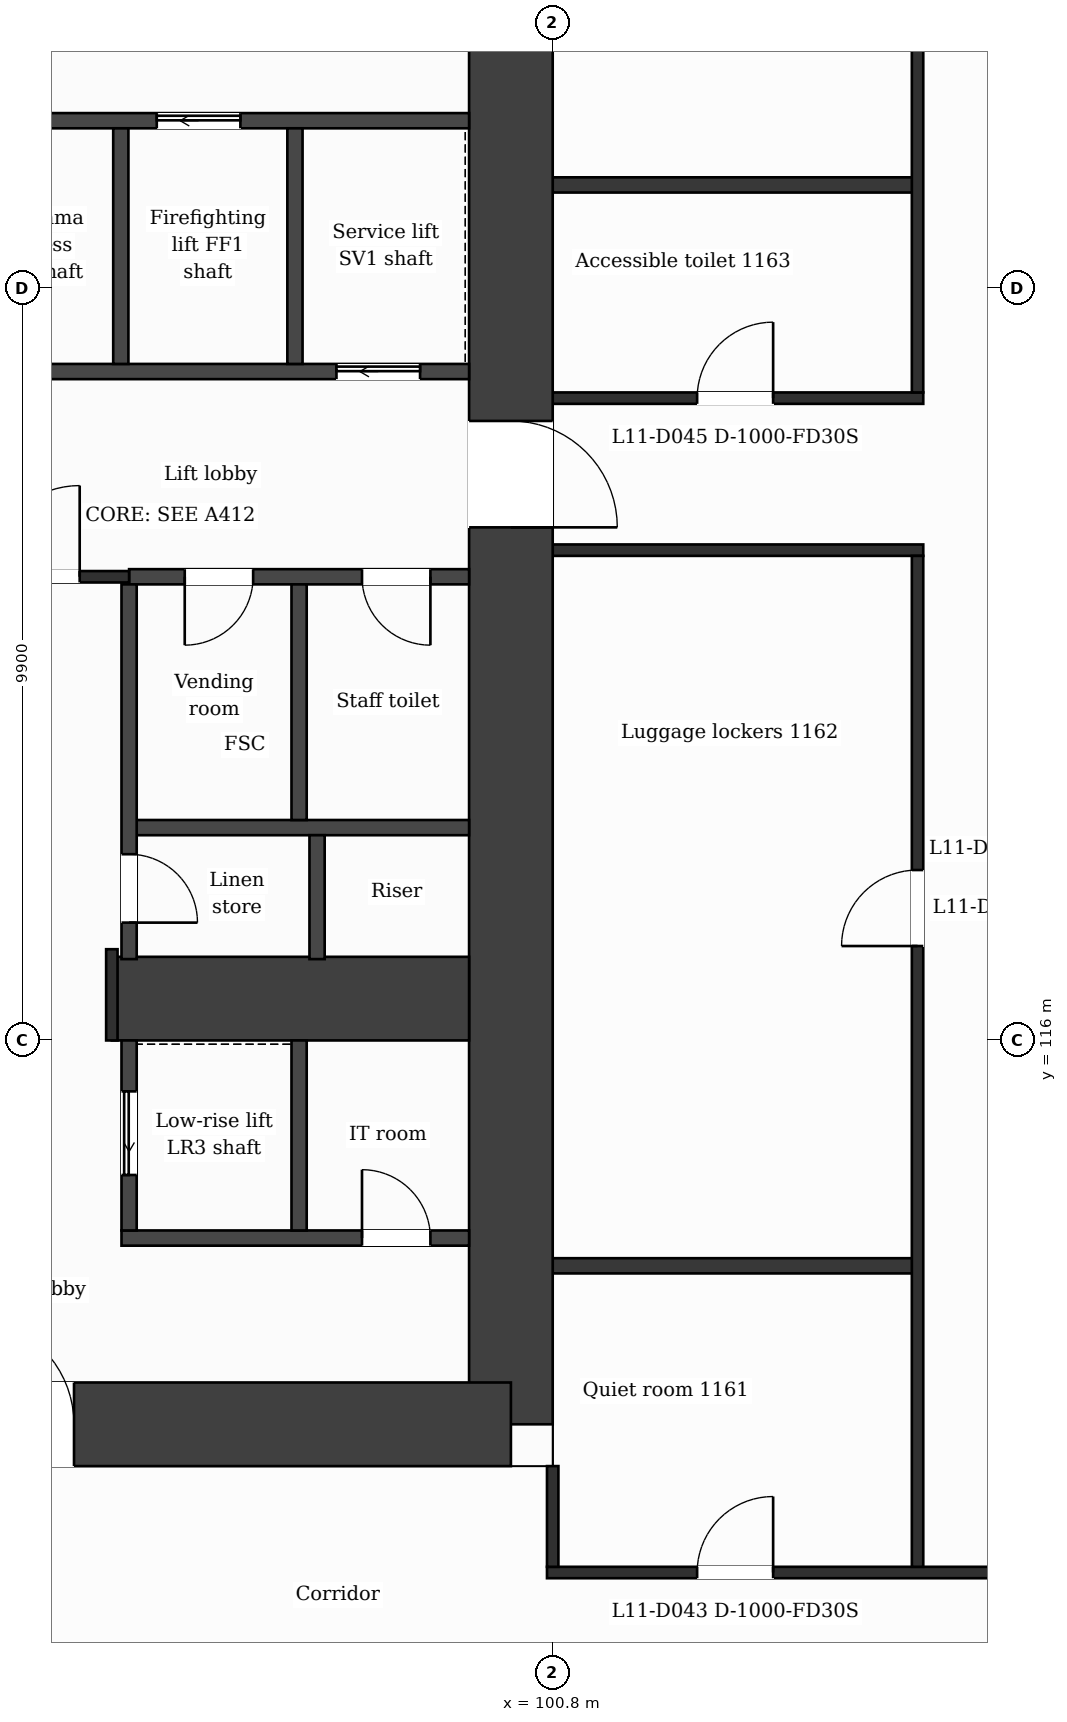
"""IFC4 building model, lengths in metres.
Left out: names, types, materials, properties, quantities, classifications, styles, units other than length and angle.
Written with IfcOpenShell. Run it as: python <this file> out.ifc"""

import sys

from ifc_helpers import new_model, si_unit, direction, frame, frame_2d, origin, place, context, subcontext, project, spatial, rectangle, extrude, element, fill, save


model = new_model("IFC4")
c1 = context("Model", 3, precision=1e-05, world=origin(), true_north=direction((0.0, 1.0)))
c2 = subcontext(c1, "Body", "Model", "MODEL_VIEW")
j1 = project(units=[si_unit("LENGTHUNIT", "METRE"), si_unit("PLANEANGLEUNIT", "RADIAN")], contexts=[c1])
p1 = place(None, origin())
s1 = spatial("IfcSite", under=j1, at=p1, CompositionType="ELEMENT")
p2 = place(p1, origin())
s2 = spatial("IfcBuilding", under=s1, at=p2, CompositionType="ELEMENT")
p3 = place(p2, frame((0.0, 0.0, 56.5)))
s3 = spatial("IfcBuildingStorey", under=s2, at=p3, CompositionType="ELEMENT", Elevation=56.5)
p4 = place(p3, frame((100.25, 131.85, 0.0), z_axis=(0.0, 0.0, 1.0), x_axis=(0.0, -1.0, 0.0)))
e1 = element("IfcWall", 1, at=p4, inside=s3, PredefinedType="SHEAR", context=c2, shape_type="SweptSolid", body=[
    extrude(rectangle(XDim=20.9, YDim=1.1, at=frame_2d((10.45, 0.0))), origin(), (0.0, 0.0, 1.0), 3.5),
])
p5 = place(p4, frame((7.7, 0.0, 0.0)))
e2 = element("IfcOpeningElement", 2, at=p5, cuts=e1, PredefinedType="OPENING", context=c2, shape_type="SweptSolid", body=[
    extrude(rectangle(XDim=1.4, YDim=2.1, at=frame_2d((0.7, 1.05))), frame((0.0, 0.56, 0.0), z_axis=(0.0, -1.0, 0.0), x_axis=(1.0, 0.0, 0.0)), (0.0, 0.0, 1.0), 1.12),
])
p6 = place(p3, frame((100.25, 110.95, 0.0), z_axis=(0.0, 0.0, 1.0), x_axis=(-1.0, 0.0, 0.0)))
e3 = element("IfcWall", 3, at=p6, inside=s3, PredefinedType="SHEAR", context=c2, shape_type="SweptSolid", body=[
    extrude(rectangle(XDim=13.952, YDim=1.1, at=frame_2d((6.976, 0.0))), origin(), (0.0, 0.0, 1.0), 3.5),
])
p7 = place(p6, frame((5.748, 0.0, 0.0)))
e4 = element("IfcOpeningElement", 4, at=p7, cuts=e3, PredefinedType="OPENING", context=c2, shape_type="SweptSolid", body=[
    extrude(rectangle(XDim=1.4, YDim=2.1, at=frame_2d((0.7, 1.05))), frame((0.0, 0.56, 0.0), z_axis=(0.0, -1.0, 0.0), x_axis=(1.0, 0.0, 0.0)), (0.0, 0.0, 1.0), 1.12),
])
p8 = place(p3, frame((95.0, 116.55, 0.0), z_axis=(0.0, 0.0, 1.0), x_axis=(1.0, 0.0, 0.0)))
e5 = element("IfcWall", 5, at=p8, inside=s3, PredefinedType="SHEAR", context=c2, shape_type="SweptSolid", body=[
    extrude(rectangle(XDim=4.7, YDim=1.1, at=frame_2d((2.35, 0.0))), origin(), (0.0, 0.0, 1.0), 3.5),
])
p9 = place(p3, frame((100.725, 109.0, 0.0), z_axis=(0.0, 0.0, 1.0), x_axis=(1.0, 0.0, 0.0)))
e6 = element("IfcWall", 6, at=p9, inside=s3, PredefinedType="PARTITIONING", context=c2, shape_type="SweptSolid", body=[
    extrude(rectangle(XDim=25.35, YDim=0.15, at=frame_2d((12.675, 0.0))), origin(), (0.0, 0.0, 1.0), 3.18),
])
p10 = place(p9, frame((1.975, 0.0, 0.0)))
e7 = element("IfcOpeningElement", 7, at=p10, cuts=e6, PredefinedType="OPENING", context=c2, shape_type="SweptSolid", body=[
    extrude(rectangle(XDim=1.0, YDim=2.1, at=frame_2d((0.5, 1.05))), frame((0.0, 0.085, 0.0), z_axis=(0.0, -1.0, 0.0), x_axis=(1.0, 0.0, 0.0)), (0.0, 0.0, 1.0), 0.17),
])
p11 = place(p9, frame((10.325, 0.0, 0.0)))
e8 = element("IfcOpeningElement", 8, at=p11, cuts=e6, PredefinedType="OPENING", context=c2, shape_type="SweptSolid", body=[
    extrude(rectangle(XDim=1.0, YDim=2.1, at=frame_2d((0.5, 1.05))), frame((0.0, 0.085, 0.0), z_axis=(0.0, -1.0, 0.0), x_axis=(1.0, 0.0, 0.0)), (0.0, 0.0, 1.0), 0.17),
])
p12 = place(p9, frame((14.9, 0.0, 0.0)))
e9 = element("IfcOpeningElement", 9, at=p12, cuts=e6, PredefinedType="OPENING", context=c2, shape_type="SweptSolid", body=[
    extrude(rectangle(XDim=1.0, YDim=2.1, at=frame_2d((0.5, 1.05))), frame((0.0, 0.085, 0.0), z_axis=(0.0, -1.0, 0.0), x_axis=(1.0, 0.0, 0.0)), (0.0, 0.0, 1.0), 0.17),
])
p13 = place(p9, frame((22.685, 0.0, 0.0)))
e10 = element("IfcOpeningElement", 10, at=p13, cuts=e6, PredefinedType="OPENING", context=c2, shape_type="SweptSolid", body=[
    extrude(rectangle(XDim=1.0, YDim=2.1, at=frame_2d((0.5, 1.05))), frame((0.0, 0.085, 0.0), z_axis=(0.0, -1.0, 0.0), x_axis=(1.0, 0.0, 0.0)), (0.0, 0.0, 1.0), 0.17),
])
p14 = place(p3, frame((100.8, 113.035, 0.0), z_axis=(0.0, 0.0, 1.0), x_axis=(1.0, 0.0, 0.0)))
e11 = element("IfcWall", 11, at=p14, inside=s3, PredefinedType="PARTITIONING", context=c2, shape_type="SweptSolid", body=[
    extrude(rectangle(XDim=4.8, YDim=0.2, at=frame_2d((2.4, 0.0))), origin(), (0.0, 0.0, 1.0), 3.18),
])
p15 = place(p3, frame((95.127, 113.4, 0.0), z_axis=(0.0, 0.0, 1.0), x_axis=(1.0, 0.0, 0.0)))
e12 = element("IfcWall", 12, at=p15, inside=s3, PredefinedType="PARTITIONING", context=c2, shape_type="SweptSolid", body=[
    extrude(rectangle(XDim=4.573, YDim=0.2, at=frame_2d((2.287, 0.0))), origin(), (0.0, 0.0, 1.0), 3.18),
])
p16 = place(p15, frame((3.164, 0.0, 0.0)))
e13 = element("IfcOpeningElement", 13, at=p16, cuts=e12, PredefinedType="OPENING", context=c2, shape_type="SweptSolid", body=[
    extrude(rectangle(XDim=0.9, YDim=2.1, at=frame_2d((0.45, 1.05))), frame((0.0, 0.11, 0.0), z_axis=(0.0, -1.0, 0.0), x_axis=(1.0, 0.0, 0.0)), (0.0, 0.0, 1.0), 0.22),
])
p17 = place(p3, frame((95.227, 118.8, 0.0), z_axis=(0.0, 0.0, 1.0), x_axis=(1.0, 0.0, 0.0)))
e14 = element("IfcWall", 14, at=p17, inside=s3, PredefinedType="PARTITIONING", context=c2, shape_type="SweptSolid", body=[
    extrude(rectangle(XDim=4.473, YDim=0.2, at=frame_2d((2.236, 0.0))), origin(), (0.0, 0.0, 1.0), 3.18),
])
p18 = place(p3, frame((95.227, 122.1, 0.0), z_axis=(0.0, 0.0, 1.0), x_axis=(1.0, 0.0, 0.0)))
e15 = element("IfcWall", 15, at=p18, inside=s3, PredefinedType="PARTITIONING", context=c2, shape_type="SweptSolid", body=[
    extrude(rectangle(XDim=4.473, YDim=0.2, at=frame_2d((2.236, 0.0))), origin(), (0.0, 0.0, 1.0), 3.18),
])
p19 = place(p18, frame((0.732, 0.0, 0.0)))
e16 = element("IfcOpeningElement", 16, at=p19, cuts=e15, PredefinedType="OPENING", context=c2, shape_type="SweptSolid", body=[
    extrude(rectangle(XDim=0.9, YDim=2.1, at=frame_2d((0.45, 1.05))), frame((0.0, 0.11, 0.0), z_axis=(0.0, -1.0, 0.0), x_axis=(1.0, 0.0, 0.0)), (0.0, 0.0, 1.0), 0.22),
])
p20 = place(p18, frame((3.064, 0.0, 0.0)))
e17 = element("IfcOpeningElement", 17, at=p20, cuts=e15, PredefinedType="OPENING", context=c2, shape_type="SweptSolid", body=[
    extrude(rectangle(XDim=0.9, YDim=2.1, at=frame_2d((0.45, 1.05))), frame((0.0, 0.11, 0.0), z_axis=(0.0, -1.0, 0.0), x_axis=(1.0, 0.0, 0.0)), (0.0, 0.0, 1.0), 0.22),
])
p21 = place(p3, frame((92.827, 122.1, 0.0), z_axis=(0.0, 0.0, 1.0), x_axis=(1.0, 0.0, 0.0)))
e18 = element("IfcWall", 18, at=p21, inside=s3, PredefinedType="PARTITIONING", context=c2, shape_type="SweptSolid", body=[
    extrude(rectangle(XDim=2.4, YDim=0.15, at=frame_2d((1.2, 0.0))), origin(), (0.0, 0.0, 1.0), 3.18),
])
p22 = place(p21, frame((0.55, 0.0, 0.0)))
e19 = element("IfcOpeningElement", 19, at=p22, cuts=e18, PredefinedType="OPENING", context=c2, shape_type="SweptSolid", body=[
    extrude(rectangle(XDim=1.2, YDim=2.1, at=frame_2d((0.6, 1.05))), frame((0.0, 0.085, 0.0), z_axis=(0.0, -1.0, 0.0), x_axis=(1.0, 0.0, 0.0)), (0.0, 0.0, 1.0), 0.17),
])
p23 = place(p3, frame((100.8, 122.45, 0.0), z_axis=(0.0, 0.0, 1.0), x_axis=(1.0, 0.0, 0.0)))
e20 = element("IfcWall", 20, at=p23, inside=s3, PredefinedType="PARTITIONING", context=c2, shape_type="SweptSolid", body=[
    extrude(rectangle(XDim=4.875, YDim=0.15, at=frame_2d((2.438, 0.0))), origin(), (0.0, 0.0, 1.0), 3.18),
])
p24 = place(p3, frame((100.8, 124.45, 0.0), z_axis=(0.0, 0.0, 1.0), x_axis=(1.0, 0.0, 0.0)))
e21 = element("IfcWall", 21, at=p24, inside=s3, PredefinedType="PARTITIONING", context=c2, shape_type="SweptSolid", body=[
    extrude(rectangle(XDim=4.875, YDim=0.15, at=frame_2d((2.438, 0.0))), origin(), (0.0, 0.0, 1.0), 3.18),
])
p25 = place(p24, frame((1.9, 0.0, 0.0)))
e22 = element("IfcOpeningElement", 22, at=p25, cuts=e21, PredefinedType="OPENING", context=c2, shape_type="SweptSolid", body=[
    extrude(rectangle(XDim=1.0, YDim=2.1, at=frame_2d((0.5, 1.05))), frame((0.0, 0.085, 0.0), z_axis=(0.0, -1.0, 0.0), x_axis=(1.0, 0.0, 0.0)), (0.0, 0.0, 1.0), 0.17),
])
p26 = place(p3, frame((92.702, 124.8, 0.0), z_axis=(0.0, 0.0, 1.0), x_axis=(1.0, 0.0, 0.0)))
e23 = element("IfcWall", 23, at=p26, inside=s3, PredefinedType="PARTITIONING", context=c2, shape_type="SweptSolid", body=[
    extrude(rectangle(XDim=6.998, YDim=0.2, at=frame_2d((3.499, 0.0))), origin(), (0.0, 0.0, 1.0), 3.18),
])
p27 = place(p26, frame((5.253, 0.0, 0.0)))
e24 = element("IfcOpeningElement", 24, at=p27, cuts=e23, PredefinedType="OPENING", context=c2, shape_type="SweptSolid", body=[
    extrude(rectangle(XDim=1.1, YDim=2.1, at=frame_2d((0.55, 1.05))), frame((0.0, 0.11, 0.0), z_axis=(0.0, -1.0, 0.0), x_axis=(1.0, 0.0, 0.0)), (0.0, 0.0, 1.0), 0.22),
])
p28 = place(p3, frame((100.8, 127.255, 0.0), z_axis=(0.0, 0.0, 1.0), x_axis=(1.0, 0.0, 0.0)))
e25 = element("IfcWall", 25, at=p28, inside=s3, PredefinedType="PARTITIONING", context=c2, shape_type="SweptSolid", body=[
    extrude(rectangle(XDim=4.8, YDim=0.2, at=frame_2d((2.4, 0.0))), origin(), (0.0, 0.0, 1.0), 3.18),
])
p29 = place(p3, frame((92.827, 128.1, 0.0), z_axis=(0.0, 0.0, 1.0), x_axis=(1.0, 0.0, 0.0)))
e26 = element("IfcWall", 26, at=p29, inside=s3, PredefinedType="PARTITIONING", context=c2, shape_type="SweptSolid", body=[
    extrude(rectangle(XDim=6.873, YDim=0.2, at=frame_2d((3.437, 0.0))), origin(), (0.0, 0.0, 1.0), 3.18),
])
p30 = place(p29, frame((2.764, 0.0, 0.0)))
e27 = element("IfcOpeningElement", 27, at=p30, cuts=e26, PredefinedType="OPENING", context=c2, shape_type="SweptSolid", body=[
    extrude(rectangle(XDim=1.1, YDim=2.1, at=frame_2d((0.55, 1.05))), frame((0.0, 0.11, 0.0), z_axis=(0.0, -1.0, 0.0), x_axis=(1.0, 0.0, 0.0)), (0.0, 0.0, 1.0), 0.22),
])
p31 = place(p3, frame((95.0, 116.0, 0.0), z_axis=(0.0, 0.0, 1.0), x_axis=(0.0, 1.0, 0.0)))
e28 = element("IfcWall", 28, at=p31, inside=s3, PredefinedType="PARTITIONING", context=c2, shape_type="SweptSolid", body=[
    extrude(rectangle(XDim=1.2, YDim=0.15, at=frame_2d((0.6, 0.0))), origin(), (0.0, 0.0, 1.0), 3.18),
])
p32 = place(p3, frame((95.118, 124.9, 0.0), z_axis=(0.0, 0.0, 1.0), x_axis=(0.0, 1.0, 0.0)))
e29 = element("IfcWall", 29, at=p32, inside=s3, PredefinedType="PARTITIONING", context=c2, shape_type="SweptSolid", body=[
    extrude(rectangle(XDim=3.1, YDim=0.2, at=frame_2d((1.55, 0.0))), origin(), (0.0, 0.0, 1.0), 3.18),
])
p33 = place(p3, frame((95.227, 113.5, 0.0), z_axis=(0.0, 0.0, 1.0), x_axis=(0.0, 1.0, 0.0)))
e30 = element("IfcWall", 30, at=p33, inside=s3, PredefinedType="PARTITIONING", context=c2, shape_type="SweptSolid", body=[
    extrude(rectangle(XDim=2.5, YDim=0.2, at=frame_2d((1.25, 0.0))), origin(), (0.0, 0.0, 1.0), 3.18),
])
p34 = place(p33, frame((0.73, 0.0, 0.0)))
e31 = element("IfcOpeningElement", 31, at=p34, cuts=e30, PredefinedType="OPENING", context=c2, shape_type="SweptSolid", body=[
    extrude(rectangle(XDim=1.1, YDim=2.1, at=frame_2d((0.55, 1.05))), frame((0.0, 0.11, 0.0), z_axis=(0.0, -1.0, 0.0), x_axis=(1.0, 0.0, 0.0)), (0.0, 0.0, 1.0), 0.22),
])
p35 = place(p3, frame((95.227, 117.07, 0.0), z_axis=(0.0, 0.0, 1.0), x_axis=(0.0, 1.0, 0.0)))
e32 = element("IfcWall", 32, at=p35, inside=s3, PredefinedType="PARTITIONING", context=c2, shape_type="SweptSolid", body=[
    extrude(rectangle(XDim=4.93, YDim=0.2, at=frame_2d((2.465, 0.0))), origin(), (0.0, 0.0, 1.0), 3.18),
])
p36 = place(p35, frame((0.48, 0.0, 0.0)))
e33 = element("IfcOpeningElement", 33, at=p36, cuts=e32, PredefinedType="OPENING", context=c2, shape_type="SweptSolid", body=[
    extrude(rectangle(XDim=0.9, YDim=2.1, at=frame_2d((0.45, 1.05))), frame((0.0, 0.11, 0.0), z_axis=(0.0, -1.0, 0.0), x_axis=(1.0, 0.0, 0.0)), (0.0, 0.0, 1.0), 0.22),
])
p37 = place(p3, frame((97.409, 124.9, 0.0), z_axis=(0.0, 0.0, 1.0), x_axis=(0.0, 1.0, 0.0)))
e34 = element("IfcWall", 34, at=p37, inside=s3, PredefinedType="PARTITIONING", context=c2, shape_type="SweptSolid", body=[
    extrude(rectangle(XDim=3.1, YDim=0.2, at=frame_2d((1.55, 0.0))), origin(), (0.0, 0.0, 1.0), 3.18),
])
p38 = place(p3, frame((97.463, 113.5, 0.0), z_axis=(0.0, 0.0, 1.0), x_axis=(0.0, 1.0, 0.0)))
e35 = element("IfcWall", 35, at=p38, inside=s3, PredefinedType="PARTITIONING", context=c2, shape_type="SweptSolid", body=[
    extrude(rectangle(XDim=2.5, YDim=0.2, at=frame_2d((1.25, 0.0))), origin(), (0.0, 0.0, 1.0), 3.18),
])
p39 = place(p3, frame((97.463, 118.9, 0.0), z_axis=(0.0, 0.0, 1.0), x_axis=(0.0, 1.0, 0.0)))
e36 = element("IfcWall", 36, at=p39, inside=s3, PredefinedType="PARTITIONING", context=c2, shape_type="SweptSolid", body=[
    extrude(rectangle(XDim=3.1, YDim=0.2, at=frame_2d((1.55, 0.0))), origin(), (0.0, 0.0, 1.0), 3.18),
])
p40 = place(p3, frame((97.7, 117.07, 0.0), z_axis=(0.0, 0.0, 1.0), x_axis=(0.0, 1.0, 0.0)))
e37 = element("IfcWall", 37, at=p40, inside=s3, PredefinedType="PARTITIONING", context=c2, shape_type="SweptSolid", body=[
    extrude(rectangle(XDim=1.63, YDim=0.2, at=frame_2d((0.815, 0.0))), origin(), (0.0, 0.0, 1.0), 3.18),
])
p41 = place(p3, frame((100.8, 109.075, 0.0), z_axis=(0.0, 0.0, 1.0), x_axis=(0.0, 1.0, 0.0)))
e38 = element("IfcWall", 38, at=p41, inside=s3, PredefinedType="PARTITIONING", context=c2, shape_type="SweptSolid", body=[
    extrude(rectangle(XDim=1.325, YDim=0.15, at=frame_2d((0.663, 0.0))), origin(), (0.0, 0.0, 1.0), 3.18),
])
p42 = place(p3, frame((105.6, 109.075, 0.0), z_axis=(0.0, 0.0, 1.0), x_axis=(0.0, 1.0, 0.0)))
e39 = element("IfcWall", 39, at=p42, inside=s3, PredefinedType="PARTITIONING", context=c2, shape_type="SweptSolid", body=[
    extrude(rectangle(XDim=13.3, YDim=0.15, at=frame_2d((6.65, 0.0))), origin(), (0.0, 0.0, 1.0), 3.18),
])
p43 = place(p42, frame((8.167, 0.0, 0.0)))
e40 = element("IfcOpeningElement", 40, at=p43, cuts=e39, PredefinedType="OPENING", context=c2, shape_type="SweptSolid", body=[
    extrude(rectangle(XDim=1.0, YDim=2.1, at=frame_2d((0.5, 1.05))), frame((0.0, 0.085, 0.0), z_axis=(0.0, -1.0, 0.0), x_axis=(1.0, 0.0, 0.0)), (0.0, 0.0, 1.0), 0.17),
])
p44 = place(p3, frame((105.6, 124.525, 0.0), z_axis=(0.0, 0.0, 1.0), x_axis=(0.0, 1.0, 0.0)))
e41 = element("IfcWall", 41, at=p44, inside=s3, PredefinedType="PARTITIONING", context=c2, shape_type="SweptSolid", body=[
    extrude(rectangle(XDim=9.2, YDim=0.15, at=frame_2d((4.6, 0.0))), origin(), (0.0, 0.0, 1.0), 3.18),
])
p45 = place(p44, frame((5.018, 0.0, 0.0)))
e42 = element("IfcOpeningElement", 42, at=p45, cuts=e41, PredefinedType="OPENING", context=c2, shape_type="SweptSolid", body=[
    extrude(rectangle(XDim=1.0, YDim=2.1, at=frame_2d((0.5, 1.05))), frame((0.0, 0.085, 0.0), z_axis=(0.0, -1.0, 0.0), x_axis=(1.0, 0.0, 0.0)), (0.0, 0.0, 1.0), 0.17),
])
p46 = place(p22, origin())
e43 = element("IfcDoor", 43, at=p46, inside=s3, OperationType="SINGLE_SWING_RIGHT", PredefinedType="DOOR", context=c2, shape_type="SweptSolid", body=[
    extrude(rectangle(XDim=1.2, YDim=2.1, at=frame_2d((0.6, 1.05))), frame((0.0, 0.025, 0.0), z_axis=(0.0, -1.0, 0.0), x_axis=(1.0, 0.0, 0.0)), (0.0, 0.0, 1.0), 0.05),
])
fill(e19, e43)
p47 = place(p30, origin())
e44 = element("IfcDoor", 44, at=p47, inside=s3, OperationType="SLIDING_TO_LEFT", PredefinedType="DOOR", context=c2, shape_type="SweptSolid", body=[
    extrude(rectangle(XDim=1.1, YDim=2.1, at=frame_2d((0.55, 1.05))), frame((0.0, 0.025, 0.0), z_axis=(0.0, -1.0, 0.0), x_axis=(1.0, 0.0, 0.0)), (0.0, 0.0, 1.0), 0.05),
])
fill(e27, e44)
p48 = place(p27, origin())
e45 = element("IfcDoor", 45, at=p48, inside=s3, OperationType="SLIDING_TO_LEFT", PredefinedType="DOOR", context=c2, shape_type="SweptSolid", body=[
    extrude(rectangle(XDim=1.1, YDim=2.1, at=frame_2d((0.55, 1.05))), frame((0.0, 0.025, 0.0), z_axis=(0.0, -1.0, 0.0), x_axis=(1.0, 0.0, 0.0)), (0.0, 0.0, 1.0), 0.05),
])
fill(e24, e45)
p49 = place(p19, origin())
e46 = element("IfcDoor", 46, at=p49, inside=s3, OperationType="SINGLE_SWING_LEFT", PredefinedType="DOOR", context=c2, shape_type="SweptSolid", body=[
    extrude(rectangle(XDim=0.9, YDim=2.1, at=frame_2d((0.45, 1.05))), frame((0.0, 0.025, 0.0), z_axis=(0.0, -1.0, 0.0), x_axis=(1.0, 0.0, 0.0)), (0.0, 0.0, 1.0), 0.05),
])
fill(e16, e46)
p50 = place(p20, origin())
e47 = element("IfcDoor", 47, at=p50, inside=s3, OperationType="SINGLE_SWING_RIGHT", PredefinedType="DOOR", context=c2, shape_type="SweptSolid", body=[
    extrude(rectangle(XDim=0.9, YDim=2.1, at=frame_2d((0.45, 1.05))), frame((0.0, 0.025, 0.0), z_axis=(0.0, -1.0, 0.0), x_axis=(1.0, 0.0, 0.0)), (0.0, 0.0, 1.0), 0.05),
])
fill(e17, e47)
p51 = place(p36, origin())
e48 = element("IfcDoor", 48, at=p51, inside=s3, OperationType="SINGLE_SWING_LEFT", PredefinedType="DOOR", context=c2, shape_type="SweptSolid", body=[
    extrude(rectangle(XDim=0.9, YDim=2.1, at=frame_2d((0.45, 1.05))), frame((0.0, 0.025, 0.0), z_axis=(0.0, -1.0, 0.0), x_axis=(1.0, 0.0, 0.0)), (0.0, 0.0, 1.0), 0.05),
])
fill(e33, e48)
p52 = place(p34, origin())
e49 = element("IfcDoor", 49, at=p52, inside=s3, OperationType="SLIDING_TO_LEFT", PredefinedType="DOOR", context=c2, shape_type="SweptSolid", body=[
    extrude(rectangle(XDim=1.1, YDim=2.1, at=frame_2d((0.55, 1.05))), frame((0.0, 0.025, 0.0), z_axis=(0.0, -1.0, 0.0), x_axis=(1.0, 0.0, 0.0)), (0.0, 0.0, 1.0), 0.05),
])
fill(e31, e49)
p53 = place(p16, origin())
e50 = element("IfcDoor", 50, at=p53, inside=s3, OperationType="SINGLE_SWING_LEFT", PredefinedType="DOOR", context=c2, shape_type="SweptSolid", body=[
    extrude(rectangle(XDim=0.9, YDim=2.1, at=frame_2d((0.45, 1.05))), frame((0.0, 0.025, 0.0), z_axis=(0.0, -1.0, 0.0), x_axis=(1.0, 0.0, 0.0)), (0.0, 0.0, 1.0), 0.05),
])
fill(e13, e50)
p54 = place(p10, origin())
e51 = element("IfcDoor", 51, at=p54, inside=s3, OperationType="SINGLE_SWING_RIGHT", PredefinedType="DOOR", context=c2, shape_type="SweptSolid", body=[
    extrude(rectangle(XDim=1.0, YDim=2.1, at=frame_2d((0.5, 1.05))), frame((0.0, 0.025, 0.0), z_axis=(0.0, -1.0, 0.0), x_axis=(1.0, 0.0, 0.0)), (0.0, 0.0, 1.0), 0.05),
])
fill(e7, e51)
p55 = place(p43, origin())
e52 = element("IfcDoor", 52, at=p55, inside=s3, OperationType="SINGLE_SWING_LEFT", PredefinedType="DOOR", context=c2, shape_type="SweptSolid", body=[
    extrude(rectangle(XDim=1.0, YDim=2.1, at=frame_2d((0.5, 1.05))), frame((0.0, 0.025, 0.0), z_axis=(0.0, -1.0, 0.0), x_axis=(1.0, 0.0, 0.0)), (0.0, 0.0, 1.0), 0.05),
])
fill(e40, e52)
p56 = place(p25, origin())
e53 = element("IfcDoor", 53, at=p56, inside=s3, OperationType="SINGLE_SWING_RIGHT", PredefinedType="DOOR", context=c2, shape_type="SweptSolid", body=[
    extrude(rectangle(XDim=1.0, YDim=2.1, at=frame_2d((0.5, 1.05))), frame((0.0, 0.025, 0.0), z_axis=(0.0, -1.0, 0.0), x_axis=(1.0, 0.0, 0.0)), (0.0, 0.0, 1.0), 0.05),
])
fill(e22, e53)
p57 = place(p7, origin())
e54 = element("IfcDoor", 54, at=p57, inside=s3, OperationType="SINGLE_SWING_RIGHT", PredefinedType="DOOR", context=c2, shape_type="SweptSolid", body=[
    extrude(rectangle(XDim=1.4, YDim=2.1, at=frame_2d((0.7, 1.05))), frame((0.0, 0.025, 0.0), z_axis=(0.0, -1.0, 0.0), x_axis=(1.0, 0.0, 0.0)), (0.0, 0.0, 1.0), 0.05),
])
fill(e4, e54)
p58 = place(p5, origin())
e55 = element("IfcDoor", 55, at=p58, inside=s3, OperationType="SINGLE_SWING_RIGHT", PredefinedType="DOOR", context=c2, shape_type="SweptSolid", body=[
    extrude(rectangle(XDim=1.4, YDim=2.1, at=frame_2d((0.7, 1.05))), frame((0.0, 0.025, 0.0), z_axis=(0.0, -1.0, 0.0), x_axis=(1.0, 0.0, 0.0)), (0.0, 0.0, 1.0), 0.05),
])
fill(e2, e55)
save(model, sys.argv[1])
